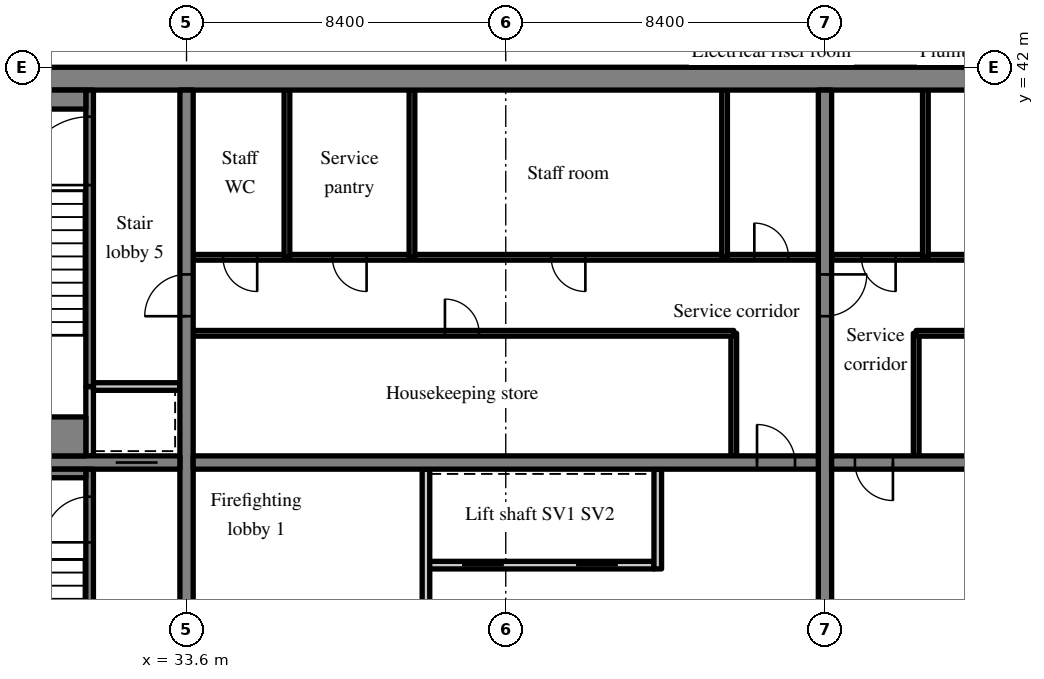
"""IFC4 building model, lengths in metres.
Left out: names, types, materials, properties, quantities, classifications, styles, units other than length and angle.
Written with IfcOpenShell. Run it as: python <this file> out.ifc"""

import sys

from ifc_helpers import new_model, si_unit, direction, frame, frame_2d, origin, place, context, subcontext, project, spatial, rectangle, extrude, source, transform, mapped, element, fill, save


model = new_model("IFC4")
c1 = context("Model", 3, precision=1e-05, world=origin(), true_north=direction((0.0, 1.0)))
c2 = subcontext(c1, "Body", "Model", "MODEL_VIEW")
j1 = project(units=[si_unit("LENGTHUNIT", "METRE"), si_unit("PLANEANGLEUNIT", "RADIAN")], contexts=[c1])
p1 = place(None, origin())
s1 = spatial("IfcSite", under=j1, at=p1, CompositionType="ELEMENT")
p2 = place(p1, origin())
s2 = spatial("IfcBuilding", under=s1, at=p2, CompositionType="ELEMENT")
p3 = place(p2, frame((0.0, 0.0, 256.9)))
s3 = spatial("IfcBuildingStorey", under=s2, at=p3, CompositionType="ELEMENT", Elevation=256.9)
m1 = source(origin(), c2, "Body", "SweptSolid", [
    extrude(rectangle(XDim=50.4, YDim=0.6, at=frame_2d((25.2, 0.0))), origin(), (0.0, 0.0, 1.0), 3.62),
])
p4 = place(p3, frame((25.2, 41.7, 0.0), z_axis=(0.0, 0.0, 1.0), x_axis=(1.0, 0.0, 0.0)))
e1 = element("IfcWall", 1, at=p4, inside=s3, PredefinedType="SHEAR", context=c2, shape_type="MappedRepresentation", body=[
    mapped(m1, transform((0.0, 0.0, 0.0), scale=1.0)),
])
m2 = source(origin(), c2, "Body", "SweptSolid", [
    extrude(rectangle(XDim=18.8, YDim=0.35, at=frame_2d((9.4, 0.0))), origin(), (0.0, 0.0, 1.0), 3.62),
])
p5 = place(p3, frame((33.6, 22.6, 0.0), z_axis=(0.0, 0.0, 1.0), x_axis=(0.0, 1.0, 0.0)))
e2 = element("IfcWall", 2, at=p5, inside=s3, PredefinedType="SHEAR", context=c2, shape_type="MappedRepresentation", body=[
    mapped(m2, transform((0.0, 0.0, 0.0), scale=1.0)),
])
m3 = source(origin(), c2, "Body", "SweptSolid", [
    extrude(rectangle(XDim=1.1, YDim=2.1, at=frame_2d((0.55, 1.05))), frame((0.0, 0.185, 0.0), z_axis=(0.0, -1.0, 0.0), x_axis=(1.0, 0.0, 0.0)), (0.0, 0.0, 1.0), 0.37),
])
p6 = place(p5, frame((12.85, 0.0, 0.0)))
e3 = element("IfcOpeningElement", 3, at=p6, cuts=e2, PredefinedType="OPENING", context=c2, shape_type="MappedRepresentation", body=[
    mapped(m3, transform((0.0, 0.0, 0.0), scale=1.0)),
])
p7 = place(p3, frame((50.4, 22.6, 0.0), z_axis=(0.0, 0.0, 1.0), x_axis=(0.0, 1.0, 0.0)))
e4 = element("IfcWall", 4, at=p7, inside=s3, PredefinedType="SHEAR", context=c2, shape_type="MappedRepresentation", body=[
    mapped(m2, transform((0.0, 0.0, 0.0), scale=1.0)),
])
p8 = place(p7, frame((12.85, 0.0, 0.0)))
e5 = element("IfcOpeningElement", 5, at=p8, cuts=e4, PredefinedType="OPENING", context=c2, shape_type="MappedRepresentation", body=[
    mapped(m3, transform((0.0, 0.0, 0.0), scale=1.0)),
])
m4 = source(origin(), c2, "Body", "SweptSolid", [
    extrude(rectangle(XDim=7.625, YDim=0.35, at=frame_2d((3.812, 0.0))), origin(), (0.0, 0.0, 1.0), 3.62),
])
p9 = place(p3, frame((25.8, 31.6, 0.0), z_axis=(0.0, 0.0, 1.0), x_axis=(1.0, 0.0, 0.0)))
e6 = element("IfcWall", 6, at=p9, inside=s3, PredefinedType="SHEAR", context=c2, shape_type="MappedRepresentation", body=[
    mapped(m4, transform((0.0, 0.0, 0.0), scale=1.0)),
])
p10 = place(p9, frame((5.938, 0.0, 0.0)))
e7 = element("IfcOpeningElement", 7, at=p10, cuts=e6, PredefinedType="OPENING", context=c2, shape_type="MappedRepresentation", body=[
    mapped(m3, transform((0.0, 0.0, 0.0), scale=1.0)),
])
m5 = source(origin(), c2, "Body", "SweptSolid", [
    extrude(rectangle(XDim=16.45, YDim=0.35, at=frame_2d((8.225, 0.0))), origin(), (0.0, 0.0, 1.0), 3.62),
])
p11 = place(p3, frame((33.775, 31.6, 0.0), z_axis=(0.0, 0.0, 1.0), x_axis=(1.0, 0.0, 0.0)))
e8 = element("IfcWall", 8, at=p11, inside=s3, PredefinedType="SHEAR", context=c2, shape_type="MappedRepresentation", body=[
    mapped(m5, transform((0.0, 0.0, 0.0), scale=1.0)),
])
m6 = source(origin(), c2, "Body", "SweptSolid", [
    extrude(rectangle(XDim=1.0, YDim=2.1, at=frame_2d((0.5, 1.05))), frame((0.0, 0.185, 0.0), z_axis=(0.0, -1.0, 0.0), x_axis=(1.0, 0.0, 0.0)), (0.0, 0.0, 1.0), 0.37),
])
p12 = place(p11, frame((14.837, 0.0, 0.0)))
e9 = element("IfcOpeningElement", 9, at=p12, cuts=e8, PredefinedType="OPENING", context=c2, shape_type="MappedRepresentation", body=[
    mapped(m6, transform((0.0, 0.0, 0.0), scale=1.0)),
])
m7 = source(origin(), c2, "Body", "SweptSolid", [
    extrude(rectangle(XDim=16.45, YDim=0.35, at=frame_2d((8.225, 0.0))), origin(), (0.0, 0.0, 1.0), 3.62),
])
p13 = place(p3, frame((50.575, 31.6, 0.0), z_axis=(0.0, 0.0, 1.0), x_axis=(1.0, 0.0, 0.0)))
e10 = element("IfcWall", 10, at=p13, inside=s3, PredefinedType="SHEAR", context=c2, shape_type="MappedRepresentation", body=[
    mapped(m7, transform((0.0, 0.0, 0.0), scale=1.0)),
])
p14 = place(p13, frame((0.613, 0.0, 0.0)))
e11 = element("IfcOpeningElement", 11, at=p14, cuts=e10, PredefinedType="OPENING", context=c2, shape_type="MappedRepresentation", body=[
    mapped(m6, transform((0.0, 0.0, 0.0), scale=1.0)),
])
m8 = source(origin(), c2, "Body", "SweptSolid", [
    extrude(rectangle(XDim=6.0, YDim=0.2, at=frame_2d((3.0, 0.0))), origin(), (0.0, 0.0, 1.0), 3.62),
])
p15 = place(p3, frame((39.9, 28.9, 0.0), z_axis=(0.0, 0.0, 1.0), x_axis=(1.0, 0.0, 0.0)))
e12 = element("IfcWall", 12, at=p15, inside=s3, PredefinedType="SOLIDWALL", context=c2, shape_type="MappedRepresentation", body=[
    mapped(m8, transform((0.0, 0.0, 0.0), scale=1.0)),
])
m9 = source(origin(), c2, "Body", "SweptSolid", [
    extrude(rectangle(XDim=1.1, YDim=2.1, at=frame_2d((0.55, 1.05))), frame((0.0, 0.11, 0.0), z_axis=(0.0, -1.0, 0.0), x_axis=(1.0, 0.0, 0.0)), (0.0, 0.0, 1.0), 0.22),
])
p16 = place(p15, frame((0.95, 0.0, 0.0)))
e13 = element("IfcOpeningElement", 13, at=p16, cuts=e12, PredefinedType="OPENING", context=c2, shape_type="MappedRepresentation", body=[
    mapped(m9, transform((0.0, 0.0, 0.0), scale=1.0)),
])
p17 = place(p15, frame((3.95, 0.0, 0.0)))
e14 = element("IfcOpeningElement", 14, at=p17, cuts=e12, PredefinedType="OPENING", context=c2, shape_type="MappedRepresentation", body=[
    mapped(m9, transform((0.0, 0.0, 0.0), scale=1.0)),
])
m10 = source(origin(), c2, "Body", "SweptSolid", [
    extrude(rectangle(XDim=8.825, YDim=0.2, at=frame_2d((4.413, 0.0))), origin(), (0.0, 0.0, 1.0), 3.62),
])
p18 = place(p3, frame((39.9, 22.6, 0.0), z_axis=(0.0, 0.0, 1.0), x_axis=(0.0, 1.0, 0.0)))
e15 = element("IfcWall", 15, at=p18, inside=s3, PredefinedType="PARTITIONING", context=c2, shape_type="MappedRepresentation", body=[
    mapped(m10, transform((0.0, 0.0, 0.0), scale=1.0)),
])
m11 = source(origin(), c2, "Body", "SweptSolid", [
    extrude(rectangle(XDim=0.9, YDim=2.1, at=frame_2d((0.45, 1.05))), frame((0.0, 0.11, 0.0), z_axis=(0.0, -1.0, 0.0), x_axis=(1.0, 0.0, 0.0)), (0.0, 0.0, 1.0), 0.22),
])
p19 = place(p18, frame((3.95, 0.0, 0.0)))
e16 = element("IfcOpeningElement", 16, at=p19, cuts=e15, PredefinedType="OPENING", context=c2, shape_type="MappedRepresentation", body=[
    mapped(m11, transform((0.0, 0.0, 0.0), scale=1.0)),
])
m12 = source(origin(), c2, "Body", "SweptSolid", [
    extrude(rectangle(XDim=2.625, YDim=0.2, at=frame_2d((1.312, 0.0))), origin(), (0.0, 0.0, 1.0), 3.62),
])
p20 = place(p3, frame((46.0, 28.8, 0.0), z_axis=(0.0, 0.0, 1.0), x_axis=(0.0, 1.0, 0.0)))
e17 = element("IfcWall", 17, at=p20, inside=s3, PredefinedType="SOLIDWALL", context=c2, shape_type="MappedRepresentation", body=[
    mapped(m12, transform((0.0, 0.0, 0.0), scale=1.0)),
])
m13 = source(origin(), c2, "Body", "SweptSolid", [
    extrude(rectangle(XDim=3.225, YDim=0.15, at=frame_2d((1.613, 0.0))), origin(), (0.0, 0.0, 1.0), 3.62),
])
p21 = place(p3, frame((48.0, 31.775, 0.0), z_axis=(0.0, 0.0, 1.0), x_axis=(0.0, 1.0, 0.0)))
e18 = element("IfcWall", 18, at=p21, inside=s3, PredefinedType="PARTITIONING", context=c2, shape_type="MappedRepresentation", body=[
    mapped(m13, transform((0.0, 0.0, 0.0), scale=1.0)),
])
m14 = source(origin(), c2, "Body", "SweptSolid", [
    extrude(rectangle(XDim=14.225, YDim=0.15, at=frame_2d((7.113, 0.0))), origin(), (0.0, 0.0, 1.0), 3.62),
])
p22 = place(p3, frame((33.775, 35.0, 0.0), z_axis=(0.0, 0.0, 1.0), x_axis=(1.0, 0.0, 0.0)))
e19 = element("IfcWall", 19, at=p22, inside=s3, PredefinedType="PARTITIONING", context=c2, shape_type="MappedRepresentation", body=[
    mapped(m14, transform((0.0, 0.0, 0.0), scale=1.0)),
])
m15 = source(origin(), c2, "Body", "SweptSolid", [
    extrude(rectangle(XDim=0.9, YDim=2.1, at=frame_2d((0.45, 1.05))), frame((0.0, 0.085, 0.0), z_axis=(0.0, -1.0, 0.0), x_axis=(1.0, 0.0, 0.0)), (0.0, 0.0, 1.0), 0.17),
])
p23 = place(p22, frame((6.625, 0.0, 0.0)))
e20 = element("IfcOpeningElement", 20, at=p23, cuts=e19, PredefinedType="OPENING", context=c2, shape_type="MappedRepresentation", body=[
    mapped(m15, transform((0.0, 0.0, 0.0), scale=1.0)),
])
m16 = source(origin(), c2, "Body", "SweptSolid", [
    extrude(rectangle(XDim=16.45, YDim=0.15, at=frame_2d((8.225, 0.0))), origin(), (0.0, 0.0, 1.0), 3.62),
])
p24 = place(p3, frame((33.775, 37.0, 0.0), z_axis=(0.0, 0.0, 1.0), x_axis=(1.0, 0.0, 0.0)))
e21 = element("IfcWall", 21, at=p24, inside=s3, PredefinedType="PARTITIONING", context=c2, shape_type="MappedRepresentation", body=[
    mapped(m16, transform((0.0, 0.0, 0.0), scale=1.0)),
])
p25 = place(p24, frame((0.784, 0.0, 0.0)))
e22 = element("IfcOpeningElement", 22, at=p25, cuts=e21, PredefinedType="OPENING", context=c2, shape_type="MappedRepresentation", body=[
    mapped(m15, transform((0.0, 0.0, 0.0), scale=1.0)),
])
p26 = place(p24, frame((3.663, 0.0, 0.0)))
e23 = element("IfcOpeningElement", 23, at=p26, cuts=e21, PredefinedType="OPENING", context=c2, shape_type="MappedRepresentation", body=[
    mapped(m15, transform((0.0, 0.0, 0.0), scale=1.0)),
])
p27 = place(p24, frame((9.42, 0.0, 0.0)))
e24 = element("IfcOpeningElement", 24, at=p27, cuts=e21, PredefinedType="OPENING", context=c2, shape_type="MappedRepresentation", body=[
    mapped(m15, transform((0.0, 0.0, 0.0), scale=1.0)),
])
p28 = place(p24, frame((14.766, 0.0, 0.0)))
e25 = element("IfcOpeningElement", 25, at=p28, cuts=e21, PredefinedType="OPENING", context=c2, shape_type="MappedRepresentation", body=[
    mapped(m15, transform((0.0, 0.0, 0.0), scale=1.0)),
])
m17 = source(origin(), c2, "Body", "SweptSolid", [
    extrude(rectangle(XDim=4.4, YDim=0.15, at=frame_2d((2.2, 0.0))), origin(), (0.0, 0.0, 1.0), 3.62),
])
for number, where, z_axis, x_axis in (
    (26, (36.242, 37.0, 0.0), (0.0, 0.0, 1.0), (0.0, 1.0, 0.0)),
    (27, (39.532, 37.0, 0.0), (0.0, 0.0, 1.0), (0.0, 1.0, 0.0)),
    (28, (47.758, 37.0, 0.0), (0.0, 0.0, 1.0), (0.0, 1.0, 0.0)),
):
    element("IfcWall", number, at=place(p3, frame(where, z_axis=z_axis, x_axis=x_axis)), inside=s3, PredefinedType="PARTITIONING", context=c2, shape_type="MappedRepresentation", body=[
        mapped(m17, transform((0.0, 0.0, 0.0), scale=1.0)),
    ])
p29 = place(p3, frame((52.8, 31.775, 0.0), z_axis=(0.0, 0.0, 1.0), x_axis=(0.0, 1.0, 0.0)))
e29 = element("IfcWall", 29, at=p29, inside=s3, PredefinedType="PARTITIONING", context=c2, shape_type="MappedRepresentation", body=[
    mapped(m13, transform((0.0, 0.0, 0.0), scale=1.0)),
])
m18 = source(origin(), c2, "Body", "SweptSolid", [
    extrude(rectangle(XDim=14.225, YDim=0.15, at=frame_2d((7.112, 0.0))), origin(), (0.0, 0.0, 1.0), 3.62),
])
p30 = place(p3, frame((67.025, 35.0, 0.0), z_axis=(0.0, 0.0, 1.0), x_axis=(-1.0, 0.0, 0.0)))
e30 = element("IfcWall", 30, at=p30, inside=s3, PredefinedType="PARTITIONING", context=c2, shape_type="MappedRepresentation", body=[
    mapped(m18, transform((0.0, 0.0, 0.0), scale=1.0)),
])
p31 = place(p30, frame((3.441, 0.0, 0.0)))
e31 = element("IfcOpeningElement", 31, at=p31, cuts=e30, PredefinedType="OPENING", context=c2, shape_type="MappedRepresentation", body=[
    mapped(m15, transform((0.0, 0.0, 0.0), scale=1.0)),
])
p32 = place(p30, frame((10.516, 0.0, 0.0)))
e32 = element("IfcOpeningElement", 32, at=p32, cuts=e30, PredefinedType="OPENING", context=c2, shape_type="MappedRepresentation", body=[
    mapped(m15, transform((0.0, 0.0, 0.0), scale=1.0)),
])
m19 = source(origin(), c2, "Body", "SweptSolid", [
    extrude(rectangle(XDim=16.45, YDim=0.15, at=frame_2d((8.225, 0.0))), origin(), (0.0, 0.0, 1.0), 3.62),
])
p33 = place(p3, frame((67.025, 37.0, 0.0), z_axis=(0.0, 0.0, 1.0), x_axis=(-1.0, 0.0, 0.0)))
e33 = element("IfcWall", 33, at=p33, inside=s3, PredefinedType="PARTITIONING", context=c2, shape_type="MappedRepresentation", body=[
    mapped(m19, transform((0.0, 0.0, 0.0), scale=1.0)),
])
p34 = place(p33, frame((6.541, 0.0, 0.0)))
e34 = element("IfcOpeningElement", 34, at=p34, cuts=e33, PredefinedType="OPENING", context=c2, shape_type="MappedRepresentation", body=[
    mapped(m15, transform((0.0, 0.0, 0.0), scale=1.0)),
])
p35 = place(p33, frame((14.766, 0.0, 0.0)))
e35 = element("IfcOpeningElement", 35, at=p35, cuts=e33, PredefinedType="OPENING", context=c2, shape_type="MappedRepresentation", body=[
    mapped(m15, transform((0.0, 0.0, 0.0), scale=1.0)),
])
p36 = place(p3, frame((53.042, 37.0, 0.0), z_axis=(0.0, 0.0, 1.0), x_axis=(0.0, 1.0, 0.0)))
e36 = element("IfcWall", 36, at=p36, inside=s3, PredefinedType="PARTITIONING", context=c2, shape_type="MappedRepresentation", body=[
    mapped(m17, transform((0.0, 0.0, 0.0), scale=1.0)),
])
m20 = source(origin(), c2, "Body", "SweptSolid", [
    extrude(rectangle(XDim=8.825, YDim=0.2, at=frame_2d((4.413, 0.0))), origin(), (0.0, 0.0, 1.0), 3.62),
])
p37 = place(p3, frame((31.05, 22.6, 0.0), z_axis=(0.0, 0.0, 1.0), x_axis=(0.0, 1.0, 0.0)))
e37 = element("IfcWall", 37, at=p37, inside=s3, PredefinedType="SOLIDWALL", context=c2, shape_type="MappedRepresentation", body=[
    mapped(m20, transform((0.0, 0.0, 0.0), scale=1.0)),
])
m21 = source(origin(), c2, "Body", "SweptSolid", [
    extrude(rectangle(XDim=1.2, YDim=2.1, at=frame_2d((0.6, 1.05))), frame((0.0, 0.11, 0.0), z_axis=(0.0, -1.0, 0.0), x_axis=(1.0, 0.0, 0.0)), (0.0, 0.0, 1.0), 0.22),
])
p38 = place(p37, frame((6.9, 0.0, 0.0)))
e38 = element("IfcOpeningElement", 38, at=p38, cuts=e37, PredefinedType="OPENING", context=c2, shape_type="MappedRepresentation", body=[
    mapped(m21, transform((0.0, 0.0, 0.0), scale=1.0)),
])
m22 = source(origin(), c2, "Body", "SweptSolid", [
    extrude(rectangle(XDim=1.825, YDim=0.2, at=frame_2d((0.913, 0.0))), origin(), (0.0, 0.0, 1.0), 3.62),
])
p39 = place(p3, frame((31.05, 31.775, 0.0), z_axis=(0.0, 0.0, 1.0), x_axis=(0.0, 1.0, 0.0)))
e39 = element("IfcWall", 39, at=p39, inside=s3, PredefinedType="SOLIDWALL", context=c2, shape_type="MappedRepresentation", body=[
    mapped(m22, transform((0.0, 0.0, 0.0), scale=1.0)),
])
m23 = source(origin(), c2, "Body", "SweptSolid", [
    extrude(rectangle(XDim=2.275, YDim=0.2, at=frame_2d((1.138, 0.0))), origin(), (0.0, 0.0, 1.0), 3.62),
])
p40 = place(p3, frame((31.15, 33.6, 0.0), z_axis=(0.0, 0.0, 1.0), x_axis=(1.0, 0.0, 0.0)))
e40 = element("IfcWall", 40, at=p40, inside=s3, PredefinedType="SOLIDWALL", context=c2, shape_type="MappedRepresentation", body=[
    mapped(m23, transform((0.0, 0.0, 0.0), scale=1.0)),
])
m24 = source(origin(), c2, "Body", "SweptSolid", [
    extrude(rectangle(XDim=7.8, YDim=0.2, at=frame_2d((3.9, 0.0))), origin(), (0.0, 0.0, 1.0), 3.62),
])
p41 = place(p3, frame((31.05, 33.6, 0.0), z_axis=(0.0, 0.0, 1.0), x_axis=(0.0, 1.0, 0.0)))
e41 = element("IfcWall", 41, at=p41, inside=s3, PredefinedType="SOLIDWALL", context=c2, shape_type="MappedRepresentation", body=[
    mapped(m24, transform((0.0, 0.0, 0.0), scale=1.0)),
])
m25 = source(origin(), c2, "Body", "SweptSolid", [
    extrude(rectangle(XDim=1.8, YDim=2.1, at=frame_2d((0.9, 1.05))), frame((0.0, 0.11, 0.0), z_axis=(0.0, -1.0, 0.0), x_axis=(1.0, 0.0, 0.0)), (0.0, 0.0, 1.0), 0.22),
])
p42 = place(p41, frame((5.3, 0.0, 0.0)))
e42 = element("IfcOpeningElement", 42, at=p42, cuts=e41, PredefinedType="OPENING", context=c2, shape_type="MappedRepresentation", body=[
    mapped(m25, transform((0.0, 0.0, 0.0), scale=1.0)),
])
m26 = source(origin(), c2, "Body", "SweptSolid", [
    extrude(rectangle(XDim=5.15, YDim=0.225, at=frame_2d((2.575, 0.0))), origin(), (0.0, 0.0, 1.0), 3.62),
])
p43 = place(p3, frame((25.8, 31.312, 0.0), z_axis=(0.0, 0.0, 1.0), x_axis=(1.0, 0.0, 0.0)))
e43 = element("IfcWall", 43, at=p43, inside=s3, PredefinedType="SOLIDWALL", context=c2, shape_type="MappedRepresentation", body=[
    mapped(m26, transform((0.0, 0.0, 0.0), scale=1.0)),
])
m27 = source(origin(), c2, "Body", "SweptSolid", [
    extrude(rectangle(XDim=5.15, YDim=0.5, at=frame_2d((2.575, 0.0))), origin(), (0.0, 0.0, 1.0), 3.62),
])
p44 = place(p3, frame((25.8, 41.15, 0.0), z_axis=(0.0, 0.0, 1.0), x_axis=(1.0, 0.0, 0.0)))
e44 = element("IfcWall", 44, at=p44, inside=s3, PredefinedType="SOLIDWALL", context=c2, shape_type="MappedRepresentation", body=[
    mapped(m27, transform((0.0, 0.0, 0.0), scale=1.0)),
])
m28 = source(origin(), c2, "Body", "SweptSolid", [
    extrude(rectangle(XDim=5.15, YDim=1.025, at=frame_2d((2.575, 0.0))), origin(), (0.0, 0.0, 1.0), 3.62),
])
p45 = place(p3, frame((25.8, 32.287, 0.0), z_axis=(0.0, 0.0, 1.0), x_axis=(1.0, 0.0, 0.0)))
e45 = element("IfcWall", 45, at=p45, inside=s3, PredefinedType="SOLIDWALL", context=c2, shape_type="MappedRepresentation", body=[
    mapped(m28, transform((0.0, 0.0, 0.0), scale=1.0)),
])
m29 = source(origin(), c2, "Body", "SweptSolid", [
    extrude(rectangle(XDim=1.0, YDim=2.1, at=frame_2d((0.5, 1.05))), frame((0.0, 0.025, 0.0), z_axis=(0.0, -1.0, 0.0), x_axis=(1.0, 0.0, 0.0)), (0.0, 0.0, 1.0), 0.05),
])
p46 = place(p12, origin())
e46 = element("IfcDoor", 46, at=p46, inside=s3, OperationType="SINGLE_SWING_LEFT", PredefinedType="DOOR", context=c2, shape_type="MappedRepresentation", body=[
    mapped(m29, transform((0.0, 0.0, 0.0), scale=1.0)),
])
fill(e9, e46)
m30 = source(origin(), c2, "Body", "SweptSolid", [
    extrude(rectangle(XDim=1.1, YDim=2.1, at=frame_2d((0.55, 1.05))), frame((0.0, 0.025, 0.0), z_axis=(0.0, -1.0, 0.0), x_axis=(1.0, 0.0, 0.0)), (0.0, 0.0, 1.0), 0.05),
])
p47 = place(p16, origin())
e47 = element("IfcDoor", 47, at=p47, inside=s3, OperationType="SLIDING_TO_LEFT", PredefinedType="DOOR", context=c2, shape_type="MappedRepresentation", body=[
    mapped(m30, transform((0.0, 0.0, 0.0), scale=1.0)),
])
fill(e13, e47)
p48 = place(p17, origin())
e48 = element("IfcDoor", 48, at=p48, inside=s3, OperationType="SLIDING_TO_RIGHT", PredefinedType="DOOR", context=c2, shape_type="MappedRepresentation", body=[
    mapped(m30, transform((0.0, 0.0, 0.0), scale=1.0)),
])
fill(e14, e48)
m31 = source(origin(), c2, "Body", "SweptSolid", [
    extrude(rectangle(XDim=0.9, YDim=2.1, at=frame_2d((0.45, 1.05))), frame((0.0, 0.025, 0.0), z_axis=(0.0, -1.0, 0.0), x_axis=(1.0, 0.0, 0.0)), (0.0, 0.0, 1.0), 0.05),
])
p49 = place(p23, origin())
e49 = element("IfcDoor", 49, at=p49, inside=s3, OperationType="SINGLE_SWING_LEFT", PredefinedType="DOOR", context=c2, shape_type="MappedRepresentation", body=[
    mapped(m31, transform((0.0, 0.0, 0.0), scale=1.0)),
])
fill(e20, e49)
p50 = place(p25, origin())
e50 = element("IfcDoor", 50, at=p50, inside=s3, OperationType="SINGLE_SWING_RIGHT", PredefinedType="DOOR", context=c2, shape_type="MappedRepresentation", body=[
    mapped(m31, transform((0.0, 0.0, 0.0), scale=1.0)),
])
fill(e22, e50)
p51 = place(p26, origin())
e51 = element("IfcDoor", 51, at=p51, inside=s3, OperationType="SINGLE_SWING_RIGHT", PredefinedType="DOOR", context=c2, shape_type="MappedRepresentation", body=[
    mapped(m31, transform((0.0, 0.0, 0.0), scale=1.0)),
])
fill(e23, e51)
p52 = place(p27, origin())
e52 = element("IfcDoor", 52, at=p52, inside=s3, OperationType="SINGLE_SWING_RIGHT", PredefinedType="DOOR", context=c2, shape_type="MappedRepresentation", body=[
    mapped(m31, transform((0.0, 0.0, 0.0), scale=1.0)),
])
fill(e24, e52)
p53 = place(p28, origin())
e53 = element("IfcDoor", 53, at=p53, inside=s3, OperationType="SINGLE_SWING_LEFT", PredefinedType="DOOR", context=c2, shape_type="MappedRepresentation", body=[
    mapped(m31, transform((0.0, 0.0, 0.0), scale=1.0)),
])
fill(e25, e53)
p54 = place(p14, origin())
e54 = element("IfcDoor", 54, at=p54, inside=s3, OperationType="SINGLE_SWING_RIGHT", PredefinedType="DOOR", context=c2, shape_type="MappedRepresentation", body=[
    mapped(m29, transform((0.0, 0.0, 0.0), scale=1.0)),
])
fill(e11, e54)
p55 = place(p35, origin())
e55 = element("IfcDoor", 55, at=p55, inside=s3, OperationType="SINGLE_SWING_LEFT", PredefinedType="DOOR", context=c2, shape_type="MappedRepresentation", body=[
    mapped(m31, transform((0.0, 0.0, 0.0), scale=1.0)),
])
fill(e35, e55)
m32 = source(origin(), c2, "Body", "SweptSolid", [
    extrude(rectangle(XDim=1.2, YDim=2.1, at=frame_2d((0.6, 1.05))), frame((0.0, 0.025, 0.0), z_axis=(0.0, -1.0, 0.0), x_axis=(1.0, 0.0, 0.0)), (0.0, 0.0, 1.0), 0.05),
])
p56 = place(p38, origin())
e56 = element("IfcDoor", 56, at=p56, inside=s3, OperationType="SINGLE_SWING_LEFT", PredefinedType="DOOR", context=c2, shape_type="MappedRepresentation", body=[
    mapped(m32, transform((0.0, 0.0, 0.0), scale=1.0)),
])
fill(e38, e56)
p57 = place(p10, origin())
e57 = element("IfcDoor", 57, at=p57, inside=s3, OperationType="SLIDING_TO_RIGHT", PredefinedType="DOOR", context=c2, shape_type="MappedRepresentation", body=[
    mapped(m30, transform((0.0, 0.0, 0.0), scale=1.0)),
])
fill(e7, e57)
m33 = source(origin(), c2, "Body", "SweptSolid", [
    extrude(rectangle(XDim=1.8, YDim=2.1, at=frame_2d((0.9, 1.05))), frame((0.0, 0.025, 0.0), z_axis=(0.0, -1.0, 0.0), x_axis=(1.0, 0.0, 0.0)), (0.0, 0.0, 1.0), 0.05),
])
p58 = place(p42, origin())
e58 = element("IfcDoor", 58, at=p58, inside=s3, OperationType="SINGLE_SWING_LEFT", PredefinedType="DOOR", context=c2, shape_type="MappedRepresentation", body=[
    mapped(m33, transform((0.0, 0.0, 0.0), scale=1.0)),
])
fill(e42, e58)
p59 = place(p6, origin())
e59 = element("IfcDoor", 59, at=p59, inside=s3, OperationType="SINGLE_SWING_LEFT", PredefinedType="DOOR", context=c2, shape_type="MappedRepresentation", body=[
    mapped(m30, transform((0.0, 0.0, 0.0), scale=1.0)),
])
fill(e3, e59)
p60 = place(p8, origin())
e60 = element("IfcDoor", 60, at=p60, inside=s3, OperationType="SINGLE_SWING_RIGHT", PredefinedType="DOOR", context=c2, shape_type="MappedRepresentation", body=[
    mapped(m30, transform((0.0, 0.0, 0.0), scale=1.0)),
])
fill(e5, e60)
save(model, sys.argv[1])
